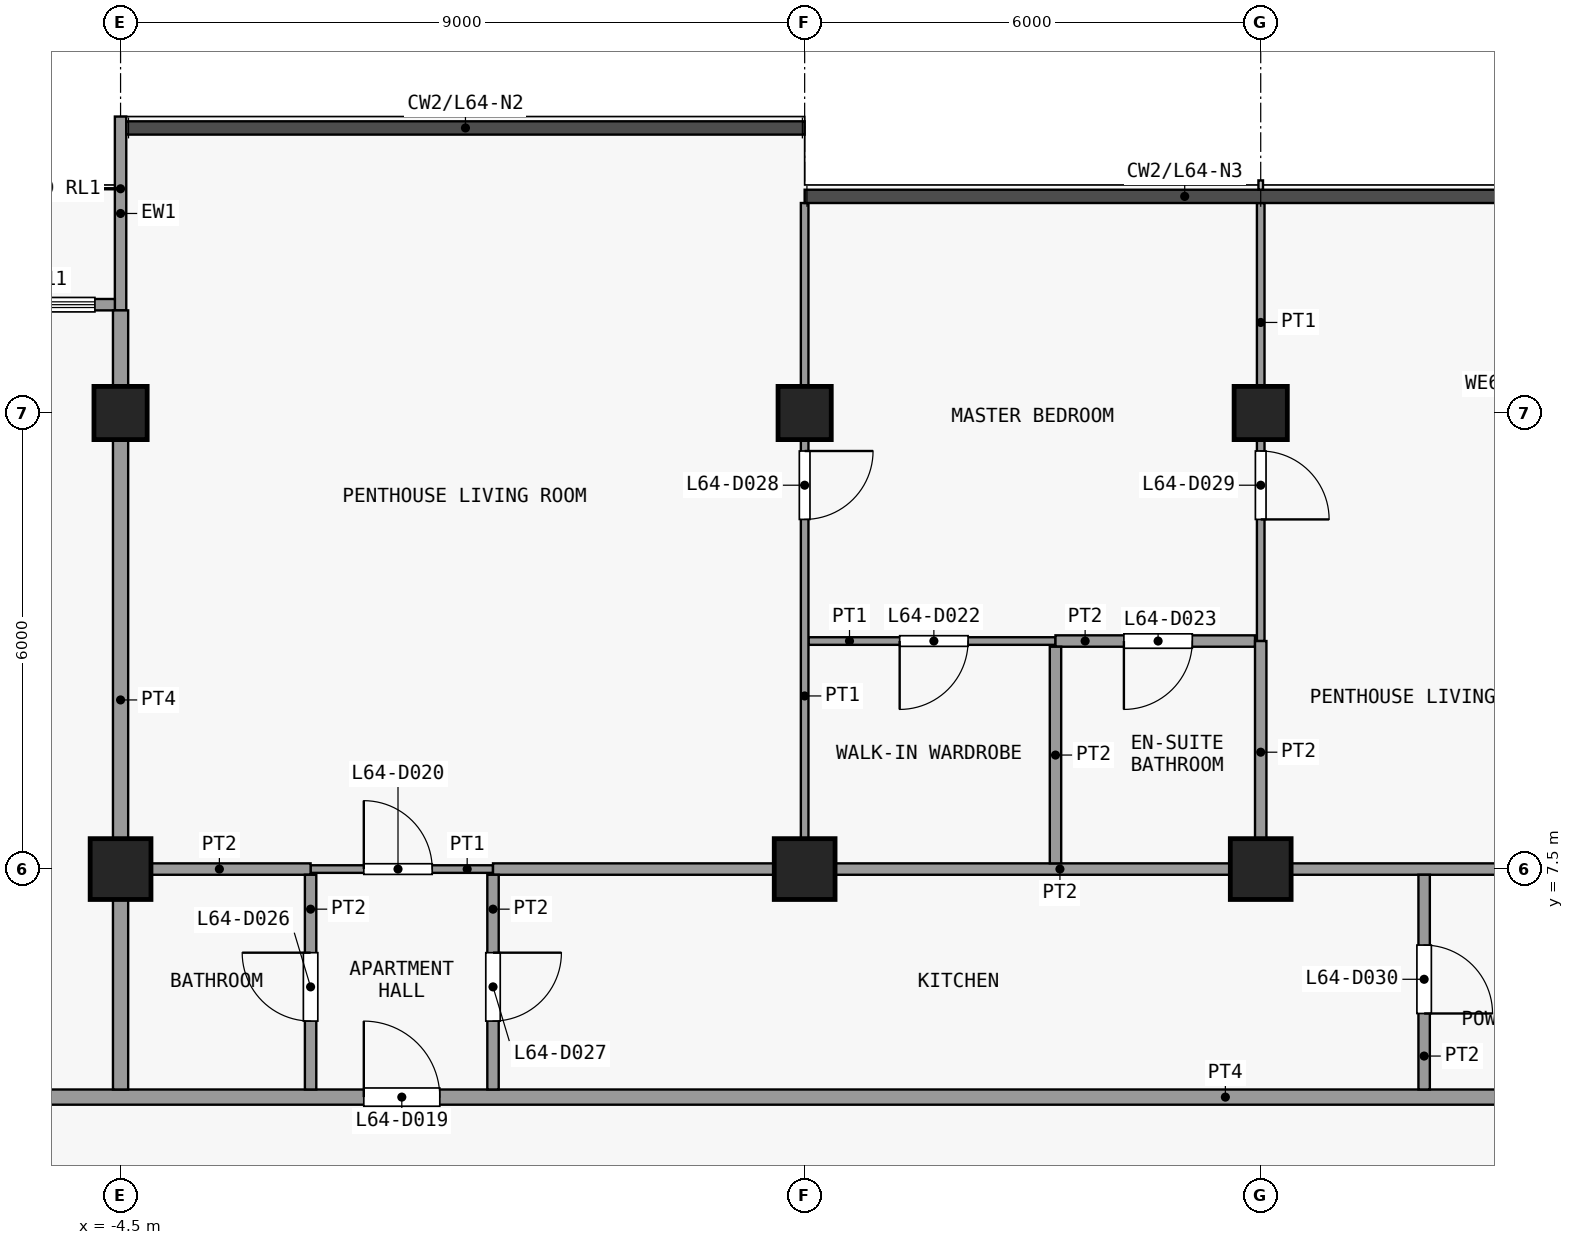
"""IFC4 building model, lengths in metres.
Left out: names, types, materials, properties, quantities, classifications, styles, units other than length and angle.
Written with IfcOpenShell. Run it as: python <this file> out.ifc"""

import sys

from ifc_helpers import new_model, si_unit, direction, frame, frame_2d, origin, origin_2d, place, context, subcontext, project, spatial, rectangle, extrude, element, fill, save


model = new_model("IFC4")
c1 = context("Model", 3, precision=1e-05, world=origin(), true_north=direction((0.0, 1.0)))
c2 = subcontext(c1, "Body", "Model", "MODEL_VIEW")
j1 = project(units=[si_unit("LENGTHUNIT", "METRE"), si_unit("PLANEANGLEUNIT", "RADIAN")], contexts=[c1])
p1 = place(None, origin())
s1 = spatial("IfcSite", under=j1, at=p1, CompositionType="ELEMENT")
p2 = place(p1, origin())
s2 = spatial("IfcBuilding", under=s1, at=p2, CompositionType="ELEMENT")
p3 = place(p2, frame((0.0, 0.0, 255.5)))
s3 = spatial("IfcBuildingStorey", under=s2, at=p3, CompositionType="ELEMENT", Elevation=255.5)
p4 = place(p3, frame((-4.5, 7.5, 0.0), z_axis=(0.0, 0.0, 1.0), x_axis=(1.0, 0.0, 0.0)))
e1 = element("IfcColumn", 1, at=p4, inside=s3, PredefinedType="COLUMN", context=c2, shape_type="SweptSolid", body=[
    extrude(rectangle(XDim=0.8, YDim=0.8, at=origin_2d()), origin(), (0.0, 0.0, 1.0), 3.6),
])
p5 = place(p3, frame((-4.5, 13.5, 0.0), z_axis=(0.0, 0.0, 1.0), x_axis=(1.0, 0.0, 0.0)))
e2 = element("IfcColumn", 2, at=p5, inside=s3, PredefinedType="COLUMN", context=c2, shape_type="SweptSolid", body=[
    extrude(rectangle(XDim=0.7, YDim=0.7, at=origin_2d()), origin(), (0.0, 0.0, 1.0), 3.6),
])
p6 = place(p3, frame((4.5, 7.5, 0.0), z_axis=(0.0, 0.0, 1.0), x_axis=(1.0, 0.0, 0.0)))
e3 = element("IfcColumn", 3, at=p6, inside=s3, PredefinedType="COLUMN", context=c2, shape_type="SweptSolid", body=[
    extrude(rectangle(XDim=0.8, YDim=0.8, at=origin_2d()), origin(), (0.0, 0.0, 1.0), 3.6),
])
p7 = place(p3, frame((4.5, 13.5, 0.0), z_axis=(0.0, 0.0, 1.0), x_axis=(1.0, 0.0, 0.0)))
e4 = element("IfcColumn", 4, at=p7, inside=s3, PredefinedType="COLUMN", context=c2, shape_type="SweptSolid", body=[
    extrude(rectangle(XDim=0.7, YDim=0.7, at=origin_2d()), origin(), (0.0, 0.0, 1.0), 3.6),
])
p8 = place(p3, frame((10.5, 7.5, 0.0), z_axis=(0.0, 0.0, 1.0), x_axis=(1.0, 0.0, 0.0)))
e5 = element("IfcColumn", 5, at=p8, inside=s3, PredefinedType="COLUMN", context=c2, shape_type="SweptSolid", body=[
    extrude(rectangle(XDim=0.8, YDim=0.8, at=origin_2d()), origin(), (0.0, 0.0, 1.0), 3.6),
])
p9 = place(p3, frame((10.5, 13.5, 0.0), z_axis=(0.0, 0.0, 1.0), x_axis=(1.0, 0.0, 0.0)))
e6 = element("IfcColumn", 6, at=p9, inside=s3, PredefinedType="COLUMN", context=c2, shape_type="SweptSolid", body=[
    extrude(rectangle(XDim=0.7, YDim=0.7, at=origin_2d()), origin(), (0.0, 0.0, 1.0), 3.6),
])
p10 = place(p3, frame((-4.5, 14.85, 0.0), z_axis=(0.0, 0.0, 1.0), x_axis=(0.0, 1.0, 0.0)))
e7 = element("IfcWall", 7, at=p10, inside=s3, PredefinedType="SOLIDWALL", context=c2, shape_type="SweptSolid", body=[
    extrude(rectangle(XDim=2.55, YDim=0.15, at=frame_2d((1.275, 0.0))), origin(), (0.0, 0.0, 1.0), 3.3),
])
p11 = place(p3, frame((-10.425, 14.925, 0.0), z_axis=(0.0, 0.0, 1.0), x_axis=(1.0, 0.0, 0.0)))
e8 = element("IfcWall", 8, at=p11, inside=s3, PredefinedType="SOLIDWALL", context=c2, shape_type="SweptSolid", body=[
    extrude(rectangle(XDim=5.85, YDim=0.15, at=frame_2d((2.925, 0.0))), origin(), (0.0, 0.0, 1.0), 3.3),
])
p12 = place(p11, frame((2.325, 0.0, 0.0)))
e9 = element("IfcOpeningElement", 9, at=p12, cuts=e8, PredefinedType="OPENING", context=c2, shape_type="SweptSolid", body=[
    extrude(rectangle(XDim=1.2, YDim=2.4, at=frame_2d((0.6, 1.2))), frame((0.0, 0.085, 0.0), z_axis=(0.0, -1.0, 0.0), x_axis=(1.0, 0.0, 0.0)), (0.0, 0.0, 1.0), 0.17),
])
p13 = place(p11, frame((0.262, 0.0, 0.9)))
e10 = element("IfcOpeningElement", 10, at=p13, cuts=e8, PredefinedType="OPENING", context=c2, shape_type="SweptSolid", body=[
    extrude(rectangle(XDim=1.8, YDim=2.1, at=frame_2d((0.9, 1.05))), frame((0.0, 0.085, 0.0), z_axis=(0.0, -1.0, 0.0), x_axis=(1.0, 0.0, 0.0)), (0.0, 0.0, 1.0), 0.17),
])
p14 = place(p11, frame((3.788, 0.0, 0.9)))
e11 = element("IfcOpeningElement", 11, at=p14, cuts=e8, PredefinedType="OPENING", context=c2, shape_type="SweptSolid", body=[
    extrude(rectangle(XDim=1.8, YDim=2.1, at=frame_2d((0.9, 1.05))), frame((0.0, 0.085, 0.0), z_axis=(0.0, -1.0, 0.0), x_axis=(1.0, 0.0, 0.0)), (0.0, 0.0, 1.0), 0.17),
])
p15 = place(p3, frame((-19.35, 4.5, 0.0), z_axis=(0.0, 0.0, 1.0), x_axis=(1.0, 0.0, 0.0)))
e12 = element("IfcWall", 12, at=p15, inside=s3, PredefinedType="PARTITIONING", context=c2, shape_type="SweptSolid", body=[
    extrude(rectangle(XDim=39.6, YDim=0.2, at=frame_2d((19.8, 0.0))), origin(), (0.0, 0.0, 1.0), 3.3),
])
p16 = place(p15, frame((1.0, 0.0, 0.0)))
e13 = element("IfcOpeningElement", 13, at=p16, cuts=e12, PredefinedType="OPENING", context=c2, shape_type="SweptSolid", body=[
    extrude(rectangle(XDim=0.9, YDim=2.1, at=frame_2d((0.45, 1.05))), frame((0.0, 0.11, 0.0), z_axis=(0.0, -1.0, 0.0), x_axis=(1.0, 0.0, 0.0)), (0.0, 0.0, 1.0), 0.22),
])
p17 = place(p15, frame((5.35, 0.0, 0.0)))
e14 = element("IfcOpeningElement", 14, at=p17, cuts=e12, PredefinedType="OPENING", context=c2, shape_type="SweptSolid", body=[
    extrude(rectangle(XDim=0.9, YDim=2.1, at=frame_2d((0.45, 1.05))), frame((0.0, 0.11, 0.0), z_axis=(0.0, -1.0, 0.0), x_axis=(1.0, 0.0, 0.0)), (0.0, 0.0, 1.0), 0.22),
])
p18 = place(p15, frame((11.35, 0.0, 0.0)))
e15 = element("IfcOpeningElement", 15, at=p18, cuts=e12, PredefinedType="OPENING", context=c2, shape_type="SweptSolid", body=[
    extrude(rectangle(XDim=0.9, YDim=2.1, at=frame_2d((0.45, 1.05))), frame((0.0, 0.11, 0.0), z_axis=(0.0, -1.0, 0.0), x_axis=(1.0, 0.0, 0.0)), (0.0, 0.0, 1.0), 0.22),
])
p19 = place(p15, frame((18.05, 0.0, 0.0)))
e16 = element("IfcOpeningElement", 16, at=p19, cuts=e12, PredefinedType="OPENING", context=c2, shape_type="SweptSolid", body=[
    extrude(rectangle(XDim=1.0, YDim=2.1, at=frame_2d((0.5, 1.05))), frame((0.0, 0.11, 0.0), z_axis=(0.0, -1.0, 0.0), x_axis=(1.0, 0.0, 0.0)), (0.0, 0.0, 1.0), 0.22),
])
p20 = place(p3, frame((-2.0, 7.5, 0.0), z_axis=(0.0, 0.0, 1.0), x_axis=(1.0, 0.0, 0.0)))
e17 = element("IfcWall", 17, at=p20, inside=s3, PredefinedType="PARTITIONING", context=c2, shape_type="SweptSolid", body=[
    extrude(rectangle(XDim=2.4, YDim=0.1, at=frame_2d((1.2, 0.0))), origin(), (0.0, 0.0, 1.0), 3.3),
])
p21 = place(p20, frame((0.7, 0.0, 0.0)))
e18 = element("IfcOpeningElement", 18, at=p21, cuts=e17, PredefinedType="OPENING", context=c2, shape_type="SweptSolid", body=[
    extrude(rectangle(XDim=0.9, YDim=2.1, at=frame_2d((0.45, 1.05))), frame((0.0, 0.06, 0.0), z_axis=(0.0, -1.0, 0.0), x_axis=(1.0, 0.0, 0.0)), (0.0, 0.0, 1.0), 0.12),
])
p22 = place(p3, frame((-4.4, 7.5, 0.0), z_axis=(0.0, 0.0, 1.0), x_axis=(1.0, 0.0, 0.0)))
e19 = element("IfcWall", 19, at=p22, inside=s3, PredefinedType="PARTITIONING", context=c2, shape_type="SweptSolid", body=[
    extrude(rectangle(XDim=2.4, YDim=0.15, at=frame_2d((1.2, 0.0))), origin(), (0.0, 0.0, 1.0), 3.3),
])
p23 = place(p3, frame((0.4, 7.5, 0.0), z_axis=(0.0, 0.0, 1.0), x_axis=(1.0, 0.0, 0.0)))
e20 = element("IfcWall", 20, at=p23, inside=s3, PredefinedType="PARTITIONING", context=c2, shape_type="SweptSolid", body=[
    extrude(rectangle(XDim=14.917, YDim=0.15, at=frame_2d((7.458, 0.0))), origin(), (0.0, 0.0, 1.0), 3.3),
])
p24 = place(p3, frame((4.55, 10.5, 0.0), z_axis=(0.0, 0.0, 1.0), x_axis=(1.0, 0.0, 0.0)))
e21 = element("IfcWall", 21, at=p24, inside=s3, PredefinedType="PARTITIONING", context=c2, shape_type="SweptSolid", body=[
    extrude(rectangle(XDim=3.25, YDim=0.1, at=frame_2d((1.625, 0.0))), origin(), (0.0, 0.0, 1.0), 3.3),
])
p25 = place(p24, frame((1.2, 0.0, 0.0)))
e22 = element("IfcOpeningElement", 22, at=p25, cuts=e21, PredefinedType="OPENING", context=c2, shape_type="SweptSolid", body=[
    extrude(rectangle(XDim=0.9, YDim=2.1, at=frame_2d((0.45, 1.05))), frame((0.0, 0.06, 0.0), z_axis=(0.0, -1.0, 0.0), x_axis=(1.0, 0.0, 0.0)), (0.0, 0.0, 1.0), 0.12),
])
p26 = place(p3, frame((7.8, 10.5, 0.0), z_axis=(0.0, 0.0, 1.0), x_axis=(1.0, 0.0, 0.0)))
e23 = element("IfcWall", 23, at=p26, inside=s3, PredefinedType="PARTITIONING", context=c2, shape_type="SweptSolid", body=[
    extrude(rectangle(XDim=2.625, YDim=0.15, at=frame_2d((1.312, 0.0))), origin(), (0.0, 0.0, 1.0), 3.3),
])
p27 = place(p26, frame((0.9, 0.0, 0.0)))
e24 = element("IfcOpeningElement", 24, at=p27, cuts=e23, PredefinedType="OPENING", context=c2, shape_type="SweptSolid", body=[
    extrude(rectangle(XDim=0.9, YDim=2.1, at=frame_2d((0.45, 1.05))), frame((0.0, 0.085, 0.0), z_axis=(0.0, -1.0, 0.0), x_axis=(1.0, 0.0, 0.0)), (0.0, 0.0, 1.0), 0.17),
])
p28 = place(p3, frame((-4.5, 4.6, 0.0), z_axis=(0.0, 0.0, 1.0), x_axis=(0.0, 1.0, 0.0)))
e25 = element("IfcWall", 25, at=p28, inside=s3, PredefinedType="PARTITIONING", context=c2, shape_type="SweptSolid", body=[
    extrude(rectangle(XDim=10.25, YDim=0.2, at=frame_2d((5.125, 0.0))), origin(), (0.0, 0.0, 1.0), 3.3),
])
p29 = place(p3, frame((-2.0, 4.6, 0.0), z_axis=(0.0, 0.0, 1.0), x_axis=(0.0, 1.0, 0.0)))
e26 = element("IfcWall", 26, at=p29, inside=s3, PredefinedType="PARTITIONING", context=c2, shape_type="SweptSolid", body=[
    extrude(rectangle(XDim=2.825, YDim=0.15, at=frame_2d((1.413, 0.0))), origin(), (0.0, 0.0, 1.0), 3.3),
])
p30 = place(p29, frame((0.9, 0.0, 0.0)))
e27 = element("IfcOpeningElement", 27, at=p30, cuts=e26, PredefinedType="OPENING", context=c2, shape_type="SweptSolid", body=[
    extrude(rectangle(XDim=0.9, YDim=2.1, at=frame_2d((0.45, 1.05))), frame((0.0, 0.085, 0.0), z_axis=(0.0, -1.0, 0.0), x_axis=(1.0, 0.0, 0.0)), (0.0, 0.0, 1.0), 0.17),
])
p31 = place(p3, frame((0.4, 4.6, 0.0), z_axis=(0.0, 0.0, 1.0), x_axis=(0.0, 1.0, 0.0)))
e28 = element("IfcWall", 28, at=p31, inside=s3, PredefinedType="PARTITIONING", context=c2, shape_type="SweptSolid", body=[
    extrude(rectangle(XDim=2.825, YDim=0.15, at=frame_2d((1.413, 0.0))), origin(), (0.0, 0.0, 1.0), 3.3),
])
p32 = place(p31, frame((0.9, 0.0, 0.0)))
e29 = element("IfcOpeningElement", 29, at=p32, cuts=e28, PredefinedType="OPENING", context=c2, shape_type="SweptSolid", body=[
    extrude(rectangle(XDim=0.9, YDim=2.1, at=frame_2d((0.45, 1.05))), frame((0.0, 0.085, 0.0), z_axis=(0.0, -1.0, 0.0), x_axis=(1.0, 0.0, 0.0)), (0.0, 0.0, 1.0), 0.17),
])
p33 = place(p3, frame((4.5, 7.575, 0.0), z_axis=(0.0, 0.0, 1.0), x_axis=(0.0, 1.0, 0.0)))
e30 = element("IfcWall", 30, at=p33, inside=s3, PredefinedType="PARTITIONING", context=c2, shape_type="SweptSolid", body=[
    extrude(rectangle(XDim=8.688, YDim=0.1, at=frame_2d((4.344, 0.0))), origin(), (0.0, 0.0, 1.0), 3.3),
])
p34 = place(p33, frame((4.525, 0.0, 0.0)))
e31 = element("IfcOpeningElement", 31, at=p34, cuts=e30, PredefinedType="OPENING", context=c2, shape_type="SweptSolid", body=[
    extrude(rectangle(XDim=0.9, YDim=2.1, at=frame_2d((0.45, 1.05))), frame((0.0, 0.06, 0.0), z_axis=(0.0, -1.0, 0.0), x_axis=(1.0, 0.0, 0.0)), (0.0, 0.0, 1.0), 0.12),
])
p35 = place(p3, frame((7.8, 7.575, 0.0), z_axis=(0.0, 0.0, 1.0), x_axis=(0.0, 1.0, 0.0)))
e32 = element("IfcWall", 32, at=p35, inside=s3, PredefinedType="PARTITIONING", context=c2, shape_type="SweptSolid", body=[
    extrude(rectangle(XDim=2.85, YDim=0.15, at=frame_2d((1.425, 0.0))), origin(), (0.0, 0.0, 1.0), 3.3),
])
p36 = place(p3, frame((10.5, 10.5, 0.0), z_axis=(0.0, 0.0, 1.0), x_axis=(0.0, 1.0, 0.0)))
e33 = element("IfcWall", 33, at=p36, inside=s3, PredefinedType="PARTITIONING", context=c2, shape_type="SweptSolid", body=[
    extrude(rectangle(XDim=5.762, YDim=0.1, at=frame_2d((2.881, 0.0))), origin(), (0.0, 0.0, 1.0), 3.3),
])
p37 = place(p36, frame((1.6, 0.0, 0.0)))
e34 = element("IfcOpeningElement", 34, at=p37, cuts=e33, PredefinedType="OPENING", context=c2, shape_type="SweptSolid", body=[
    extrude(rectangle(XDim=0.9, YDim=2.1, at=frame_2d((0.45, 1.05))), frame((0.0, 0.06, 0.0), z_axis=(0.0, -1.0, 0.0), x_axis=(1.0, 0.0, 0.0)), (0.0, 0.0, 1.0), 0.12),
])
p38 = place(p3, frame((10.5, 7.575, 0.0), z_axis=(0.0, 0.0, 1.0), x_axis=(0.0, 1.0, 0.0)))
e35 = element("IfcWall", 35, at=p38, inside=s3, PredefinedType="PARTITIONING", context=c2, shape_type="SweptSolid", body=[
    extrude(rectangle(XDim=2.925, YDim=0.15, at=frame_2d((1.462, 0.0))), origin(), (0.0, 0.0, 1.0), 3.3),
])
p39 = place(p3, frame((12.65, 4.6, 0.0), z_axis=(0.0, 0.0, 1.0), x_axis=(0.0, 1.0, 0.0)))
e36 = element("IfcWall", 36, at=p39, inside=s3, PredefinedType="PARTITIONING", context=c2, shape_type="SweptSolid", body=[
    extrude(rectangle(XDim=2.825, YDim=0.15, at=frame_2d((1.413, 0.0))), origin(), (0.0, 0.0, 1.0), 3.3),
])
p40 = place(p39, frame((1.0, 0.0, 0.0)))
e37 = element("IfcOpeningElement", 37, at=p40, cuts=e36, PredefinedType="OPENING", context=c2, shape_type="SweptSolid", body=[
    extrude(rectangle(XDim=0.9, YDim=2.1, at=frame_2d((0.45, 1.05))), frame((0.0, 0.085, 0.0), z_axis=(0.0, -1.0, 0.0), x_axis=(1.0, 0.0, 0.0)), (0.0, 0.0, 1.0), 0.17),
])
p41 = place(p14, origin())
e38 = element("IfcWindow", 38, at=p41, inside=s3, PartitioningType="SINGLE_PANEL", PredefinedType="WINDOW", context=c2, shape_type="SweptSolid", body=[
    extrude(rectangle(XDim=1.8, YDim=2.1, at=frame_2d((0.9, 1.05))), frame((0.0, 0.03, 0.0), z_axis=(0.0, -1.0, 0.0), x_axis=(1.0, 0.0, 0.0)), (0.0, 0.0, 1.0), 0.06),
])
fill(e11, e38)
p42 = place(p19, origin())
e39 = element("IfcDoor", 39, at=p42, inside=s3, OperationType="SINGLE_SWING_RIGHT", PredefinedType="DOOR", context=c2, shape_type="SweptSolid", body=[
    extrude(rectangle(XDim=1.0, YDim=2.1, at=frame_2d((0.5, 1.05))), frame((0.0, 0.025, 0.0), z_axis=(0.0, -1.0, 0.0), x_axis=(1.0, 0.0, 0.0)), (0.0, 0.0, 1.0), 0.05),
])
fill(e16, e39)
p43 = place(p21, origin())
e40 = element("IfcDoor", 40, at=p43, inside=s3, OperationType="SINGLE_SWING_RIGHT", PredefinedType="DOOR", context=c2, shape_type="SweptSolid", body=[
    extrude(rectangle(XDim=0.9, YDim=2.1, at=frame_2d((0.45, 1.05))), frame((0.0, 0.025, 0.0), z_axis=(0.0, -1.0, 0.0), x_axis=(1.0, 0.0, 0.0)), (0.0, 0.0, 1.0), 0.05),
])
fill(e18, e40)
p44 = place(p25, origin())
e41 = element("IfcDoor", 41, at=p44, inside=s3, OperationType="SINGLE_SWING_LEFT", PredefinedType="DOOR", context=c2, shape_type="SweptSolid", body=[
    extrude(rectangle(XDim=0.9, YDim=2.1, at=frame_2d((0.45, 1.05))), frame((0.0, 0.025, 0.0), z_axis=(0.0, -1.0, 0.0), x_axis=(1.0, 0.0, 0.0)), (0.0, 0.0, 1.0), 0.05),
])
fill(e22, e41)
p45 = place(p27, origin())
e42 = element("IfcDoor", 42, at=p45, inside=s3, OperationType="SINGLE_SWING_LEFT", PredefinedType="DOOR", context=c2, shape_type="SweptSolid", body=[
    extrude(rectangle(XDim=0.9, YDim=2.1, at=frame_2d((0.45, 1.05))), frame((0.0, 0.025, 0.0), z_axis=(0.0, -1.0, 0.0), x_axis=(1.0, 0.0, 0.0)), (0.0, 0.0, 1.0), 0.05),
])
fill(e24, e42)
p46 = place(p30, origin())
e43 = element("IfcDoor", 43, at=p46, inside=s3, OperationType="SINGLE_SWING_LEFT", PredefinedType="DOOR", context=c2, shape_type="SweptSolid", body=[
    extrude(rectangle(XDim=0.9, YDim=2.1, at=frame_2d((0.45, 1.05))), frame((0.0, 0.025, 0.0), z_axis=(0.0, -1.0, 0.0), x_axis=(1.0, 0.0, 0.0)), (0.0, 0.0, 1.0), 0.05),
])
fill(e27, e43)
p47 = place(p32, origin())
e44 = element("IfcDoor", 44, at=p47, inside=s3, OperationType="SINGLE_SWING_RIGHT", PredefinedType="DOOR", context=c2, shape_type="SweptSolid", body=[
    extrude(rectangle(XDim=0.9, YDim=2.1, at=frame_2d((0.45, 1.05))), frame((0.0, 0.025, 0.0), z_axis=(0.0, -1.0, 0.0), x_axis=(1.0, 0.0, 0.0)), (0.0, 0.0, 1.0), 0.05),
])
fill(e29, e44)
p48 = place(p34, origin())
e45 = element("IfcDoor", 45, at=p48, inside=s3, OperationType="SINGLE_SWING_RIGHT", PredefinedType="DOOR", context=c2, shape_type="SweptSolid", body=[
    extrude(rectangle(XDim=0.9, YDim=2.1, at=frame_2d((0.45, 1.05))), frame((0.0, 0.025, 0.0), z_axis=(0.0, -1.0, 0.0), x_axis=(1.0, 0.0, 0.0)), (0.0, 0.0, 1.0), 0.05),
])
fill(e31, e45)
p49 = place(p37, origin())
e46 = element("IfcDoor", 46, at=p49, inside=s3, OperationType="SINGLE_SWING_LEFT", PredefinedType="DOOR", context=c2, shape_type="SweptSolid", body=[
    extrude(rectangle(XDim=0.9, YDim=2.1, at=frame_2d((0.45, 1.05))), frame((0.0, 0.025, 0.0), z_axis=(0.0, -1.0, 0.0), x_axis=(1.0, 0.0, 0.0)), (0.0, 0.0, 1.0), 0.05),
])
fill(e34, e46)
p50 = place(p40, origin())
e47 = element("IfcDoor", 47, at=p50, inside=s3, OperationType="SINGLE_SWING_LEFT", PredefinedType="DOOR", context=c2, shape_type="SweptSolid", body=[
    extrude(rectangle(XDim=0.9, YDim=2.1, at=frame_2d((0.45, 1.05))), frame((0.0, 0.025, 0.0), z_axis=(0.0, -1.0, 0.0), x_axis=(1.0, 0.0, 0.0)), (0.0, 0.0, 1.0), 0.05),
])
fill(e37, e47)
save(model, sys.argv[1])
